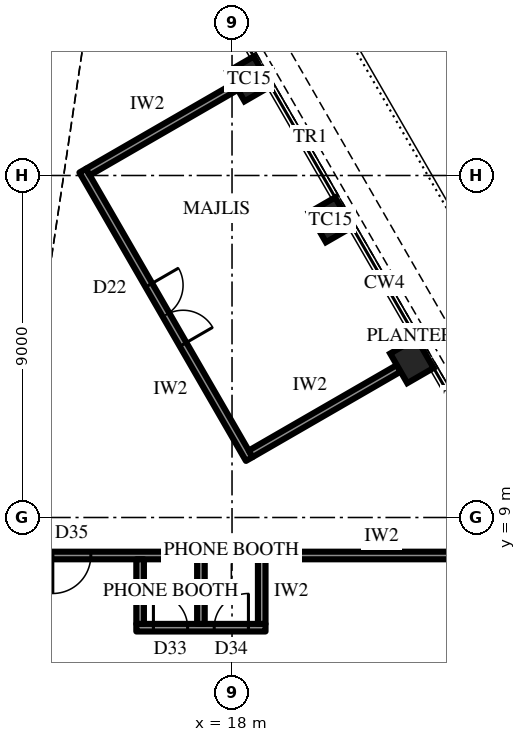
"""IFC4 building model, lengths in metres.
Left out: names, types, materials, properties, quantities, classifications, styles, units other than length and angle.
Written with IfcOpenShell. Run it as: python <this file> out.ifc"""

import sys

from ifc_helpers import new_model, si_unit, direction, frame, frame_2d, origin, origin_2d, place, context, subcontext, project, spatial, rectangle, extrude, element, fill, save


model = new_model("IFC4")
c1 = context("Model", 3, precision=1e-05, world=origin(), true_north=direction((0.0, 1.0)))
c2 = subcontext(c1, "Body", "Model", "MODEL_VIEW")
j1 = project(units=[si_unit("LENGTHUNIT", "METRE"), si_unit("PLANEANGLEUNIT", "RADIAN")], contexts=[c1])
p1 = place(None, origin())
s1 = spatial("IfcSite", under=j1, at=p1, CompositionType="ELEMENT")
p2 = place(p1, origin())
s2 = spatial("IfcBuilding", under=s1, at=p2, CompositionType="ELEMENT")
p3 = place(p2, frame((0.0, 0.0, 353.5)))
s3 = spatial("IfcBuildingStorey", under=s2, at=p3, CompositionType="ELEMENT", Elevation=353.5)
for number, where, z_axis, x_axis in (
    (1, (22.733, 13.125, 0.0), (0.0, 0.0, 1.0), (-0.5, 0.866, 0.0)),
    (2, (20.592, 16.833, 0.0), (0.0, 0.0, 1.0), (-0.5, 0.866, 0.0)),
    (3, (18.451, 20.542, 0.0), (0.0, 0.0, 1.0), (-0.5, 0.866, 0.0)),
):
    element("IfcColumn", number, at=place(p3, frame(where, z_axis=z_axis, x_axis=x_axis)), inside=s3, PredefinedType="COLUMN", context=c2, shape_type="SweptSolid", body=[
        extrude(rectangle(XDim=0.9, YDim=0.8, at=origin_2d()), origin(), (0.0, 0.0, 1.0), 4.2),
    ])
p4 = place(p3, frame((18.453, 10.538, 0.0), z_axis=(0.0, 0.0, 1.0), x_axis=(-0.500006995557, 0.86602136486, 0.0)))
e4 = element("IfcWall", 4, at=p4, inside=s3, PredefinedType="PARTITIONING", context=c2, shape_type="SweptSolid", body=[
    extrude(rectangle(XDim=8.764, YDim=0.2, at=frame_2d((4.382, 0.0))), origin(), (0.0, 0.0, 1.0), 4.0),
])
p5 = place(p4, frame((3.482, 0.0, 0.0)))
e5 = element("IfcOpeningElement", 5, at=p5, cuts=e4, PredefinedType="OPENING", context=c2, shape_type="SweptSolid", body=[
    extrude(rectangle(XDim=1.8, YDim=2.4, at=frame_2d((0.9, 1.2))), frame((0.0, 0.11, 0.0), z_axis=(0.0, -1.0, 0.0), x_axis=(1.0, 0.0, 0.0)), (0.0, 0.0, 1.0), 0.22),
])
p6 = place(p3, frame((18.49, 10.675, 0.0), z_axis=(0.0, 0.0, 1.0), x_axis=(0.866017533419, 0.500013631625, 0.0)))
e6 = element("IfcWall", 6, at=p6, inside=s3, PredefinedType="PARTITIONING", context=c2, shape_type="SweptSolid", body=[
    extrude(rectangle(XDim=4.5, YDim=0.2, at=frame_2d((2.25, 0.0))), origin(), (0.0, 0.0, 1.0), 3.082),
])
p7 = place(p3, frame((14.208, 18.092, 0.0), z_axis=(0.0, 0.0, 1.0), x_axis=(0.866031096941, 0.499990139034, 0.0)))
e7 = element("IfcWall", 7, at=p7, inside=s3, PredefinedType="PARTITIONING", context=c2, shape_type="SweptSolid", body=[
    extrude(rectangle(XDim=4.5, YDim=0.2, at=frame_2d((2.25, 0.0))), origin(), (0.0, 0.0, 1.0), 3.082),
])
p8 = place(p3, frame((12.425, 8.0, 0.0), z_axis=(0.0, 0.0, 1.0), x_axis=(1.0, 0.0, 0.0)))
e8 = element("IfcWall", 8, at=p8, inside=s3, PredefinedType="PARTITIONING", context=c2, shape_type="SweptSolid", body=[
    extrude(rectangle(XDim=13.59, YDim=0.2, at=frame_2d((6.795, 0.0))), origin(), (0.0, 0.0, 1.0), 4.0),
])
p9 = place(p8, frame((0.859, 0.0, 0.0)))
e9 = element("IfcOpeningElement", 9, at=p9, cuts=e8, PredefinedType="OPENING", context=c2, shape_type="SweptSolid", body=[
    extrude(rectangle(XDim=1.0, YDim=2.2, at=frame_2d((0.5, 1.1))), frame((0.0, 0.11, 0.0), z_axis=(0.0, -1.0, 0.0), x_axis=(1.0, 0.0, 0.0)), (0.0, 0.0, 1.0), 0.22),
])
p10 = place(p3, frame((15.482, 6.1, 0.0), z_axis=(0.0, 0.0, 1.0), x_axis=(1.0, 0.0, 0.0)))
e10 = element("IfcWall", 10, at=p10, inside=s3, PredefinedType="PARTITIONING", context=c2, shape_type="SweptSolid", body=[
    extrude(rectangle(XDim=3.4, YDim=0.2, at=frame_2d((1.7, 0.0))), origin(), (0.0, 0.0, 1.0), 4.0),
])
p11 = place(p10, frame((0.45, 0.0, 0.0)))
e11 = element("IfcOpeningElement", 11, at=p11, cuts=e10, PredefinedType="OPENING", context=c2, shape_type="SweptSolid", body=[
    extrude(rectangle(XDim=0.9, YDim=2.2, at=frame_2d((0.45, 1.1))), frame((0.0, 0.11, 0.0), z_axis=(0.0, -1.0, 0.0), x_axis=(1.0, 0.0, 0.0)), (0.0, 0.0, 1.0), 0.22),
])
p12 = place(p10, frame((2.05, 0.0, 0.0)))
e12 = element("IfcOpeningElement", 12, at=p12, cuts=e10, PredefinedType="OPENING", context=c2, shape_type="SweptSolid", body=[
    extrude(rectangle(XDim=0.9, YDim=2.2, at=frame_2d((0.45, 1.1))), frame((0.0, 0.11, 0.0), z_axis=(0.0, -1.0, 0.0), x_axis=(1.0, 0.0, 0.0)), (0.0, 0.0, 1.0), 0.22),
])
for number, where, z_axis, x_axis in (
    (13, (15.582, 7.9, 0.0), (0.0, 0.0, 1.0), (0.0, -1.0, 0.0)),
    (14, (17.182, 7.9, 0.0), (0.0, 0.0, 1.0), (0.0, -1.0, 0.0)),
    (15, (18.781, 7.9, 0.0), (0.0, 0.0, 1.0), (0.0, -1.0, 0.0)),
):
    element("IfcWall", number, at=place(p3, frame(where, z_axis=z_axis, x_axis=x_axis)), inside=s3, PredefinedType="PARTITIONING", context=c2, shape_type="SweptSolid", body=[
        extrude(rectangle(XDim=1.7, YDim=0.2, at=frame_2d((0.85, 0.0))), origin(), (0.0, 0.0, 1.0), 4.0),
    ])
p13 = place(p5, frame((1.8, 0.0, 0.0), z_axis=(0.0, 0.0, 1.0), x_axis=(-1.0, 0.0, 0.0)))
e16 = element("IfcDoor", 16, at=p13, inside=s3, OperationType="DOUBLE_DOOR_SINGLE_SWING", PredefinedType="DOOR", context=c2, shape_type="SweptSolid", body=[
    extrude(rectangle(XDim=1.8, YDim=2.4, at=frame_2d((0.9, 1.2))), frame((0.0, 0.025, 0.0), z_axis=(0.0, -1.0, 0.0), x_axis=(1.0, 0.0, 0.0)), (0.0, 0.0, 1.0), 0.05),
])
fill(e5, e16)
p14 = place(p9, frame((1.0, 0.0, 0.0), z_axis=(0.0, 0.0, 1.0), x_axis=(-1.0, 0.0, 0.0)))
e17 = element("IfcDoor", 17, at=p14, inside=s3, OperationType="SINGLE_SWING_LEFT", PredefinedType="DOOR", context=c2, shape_type="SweptSolid", body=[
    extrude(rectangle(XDim=1.0, YDim=2.2, at=frame_2d((0.5, 1.1))), frame((0.0, 0.025, 0.0), z_axis=(0.0, -1.0, 0.0), x_axis=(1.0, 0.0, 0.0)), (0.0, 0.0, 1.0), 0.05),
])
fill(e9, e17)
p15 = place(p11, origin())
e18 = element("IfcDoor", 18, at=p15, inside=s3, OperationType="SINGLE_SWING_RIGHT", PredefinedType="DOOR", context=c2, shape_type="SweptSolid", body=[
    extrude(rectangle(XDim=0.9, YDim=2.2, at=frame_2d((0.45, 1.1))), frame((0.0, 0.025, 0.0), z_axis=(0.0, -1.0, 0.0), x_axis=(1.0, 0.0, 0.0)), (0.0, 0.0, 1.0), 0.05),
])
fill(e11, e18)
p16 = place(p12, origin())
e19 = element("IfcDoor", 19, at=p16, inside=s3, OperationType="SINGLE_SWING_LEFT", PredefinedType="DOOR", context=c2, shape_type="SweptSolid", body=[
    extrude(rectangle(XDim=0.9, YDim=2.2, at=frame_2d((0.45, 1.1))), frame((0.0, 0.025, 0.0), z_axis=(0.0, -1.0, 0.0), x_axis=(1.0, 0.0, 0.0)), (0.0, 0.0, 1.0), 0.05),
])
fill(e12, e19)
save(model, sys.argv[1])
